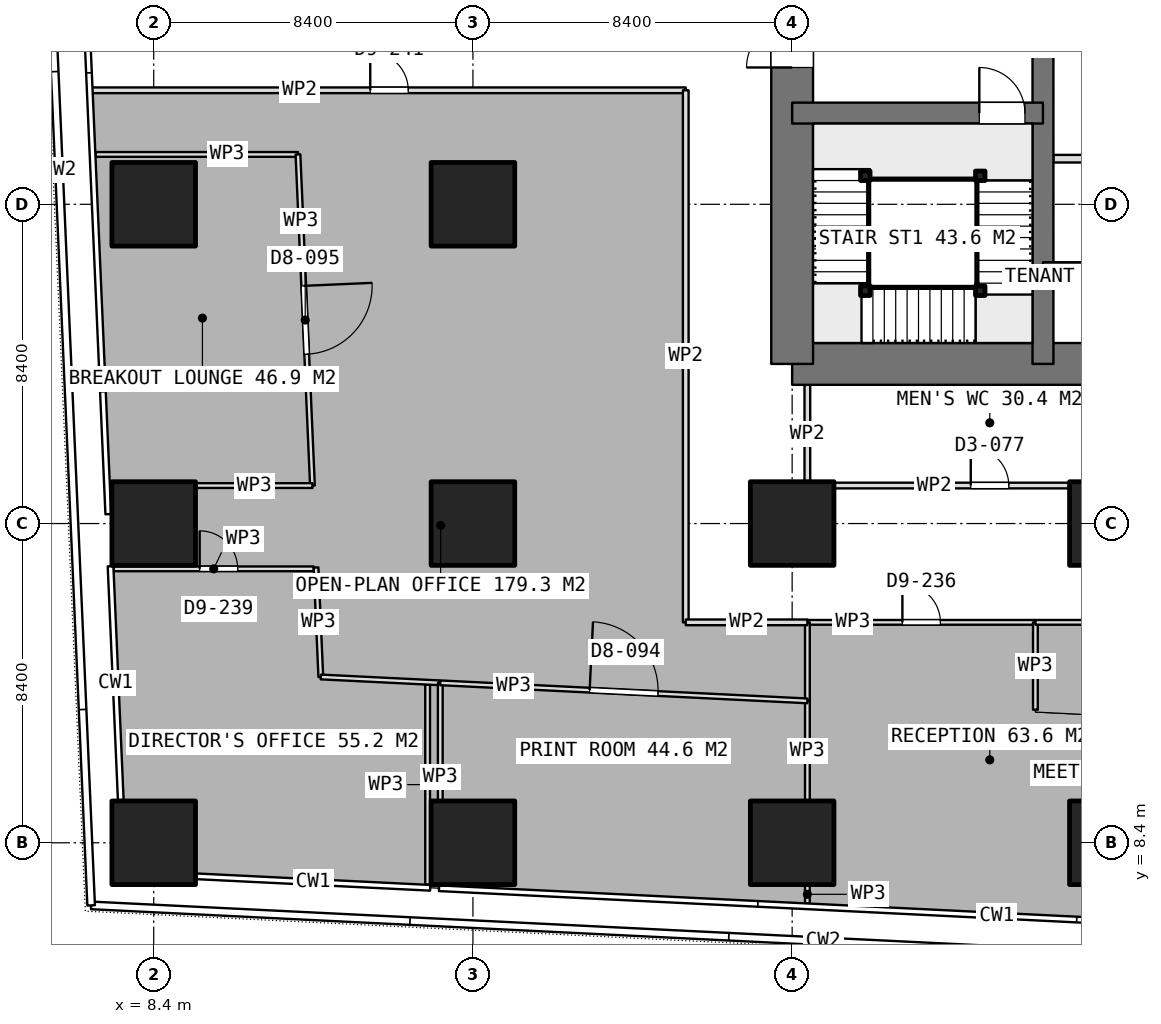
"""IFC4 building model, lengths in metres.
Left out: names, types, materials, properties, quantities, classifications, styles, units other than length and angle.
Written with IfcOpenShell. Run it as: python <this file> out.ifc"""

import sys

from ifc_helpers import new_model, si_unit, direction, frame, frame_2d, origin, origin_2d, place, context, subcontext, project, spatial, rectangle, extrude, element, fill, save


model = new_model("IFC4")
c1 = context("Model", 3, precision=1e-05, world=origin(), true_north=direction((0.0, 1.0)))
c2 = subcontext(c1, "Body", "Model", "MODEL_VIEW")
j1 = project(units=[si_unit("LENGTHUNIT", "METRE"), si_unit("PLANEANGLEUNIT", "RADIAN")], contexts=[c1])
p1 = place(None, origin())
s1 = spatial("IfcSite", under=j1, at=p1, CompositionType="ELEMENT")
p2 = place(p1, origin())
s2 = spatial("IfcBuilding", under=s1, at=p2, CompositionType="ELEMENT")
p3 = place(p2, frame((0.0, 0.0, 70.4)))
s3 = spatial("IfcBuildingStorey", under=s2, at=p3, CompositionType="ELEMENT", Elevation=70.4)
p4 = place(p3, frame((25.2, 21.0, 0.0), z_axis=(0.0, 0.0, 1.0), x_axis=(1.0, 0.0, 0.0)))
e1 = element("IfcWall", 1, at=p4, inside=s3, PredefinedType="SHEAR", context=c2, shape_type="SweptSolid", body=[
    extrude(rectangle(XDim=10.4, YDim=1.1, at=frame_2d((5.2, 0.0))), origin(), (0.0, 0.0, 1.0), 3.75),
])
p5 = place(p3, frame((25.2, 21.0, 0.0), z_axis=(0.0, 0.0, 1.0), x_axis=(0.0, 1.0, 0.0)))
e2 = element("IfcWall", 2, at=p5, inside=s3, PredefinedType="SHEAR", context=c2, shape_type="SweptSolid", body=[
    extrude(rectangle(XDim=25.2, YDim=1.1, at=frame_2d((12.6, 0.0))), origin(), (0.0, 0.0, 1.0), 3.75),
])
p6 = place(p5, frame((7.8, 0.0, 0.0)))
e3 = element("IfcOpeningElement", 3, at=p6, cuts=e2, PredefinedType="OPENING", context=c2, shape_type="SweptSolid", body=[
    extrude(rectangle(XDim=1.2, YDim=2.1, at=frame_2d((0.6, 1.05))), frame((0.0, 0.56, 0.0), z_axis=(0.0, -1.0, 0.0), x_axis=(1.0, 0.0, 0.0)), (0.0, 0.0, 1.0), 1.12),
])
p7 = place(p5, frame((14.25, 0.0, 0.0)))
e4 = element("IfcOpeningElement", 4, at=p7, cuts=e2, PredefinedType="OPENING", context=c2, shape_type="SweptSolid", body=[
    extrude(rectangle(XDim=0.9, YDim=2.1, at=frame_2d((0.45, 1.05))), frame((0.0, 0.56, 0.0), z_axis=(0.0, -1.0, 0.0), x_axis=(1.0, 0.0, 0.0)), (0.0, 0.0, 1.0), 1.12),
])
p8 = place(p5, frame((16.85, 0.0, 0.0)))
e5 = element("IfcOpeningElement", 5, at=p8, cuts=e2, PredefinedType="OPENING", context=c2, shape_type="SweptSolid", body=[
    extrude(rectangle(XDim=0.9, YDim=2.1, at=frame_2d((0.45, 1.05))), frame((0.0, 0.56, 0.0), z_axis=(0.0, -1.0, 0.0), x_axis=(1.0, 0.0, 0.0)), (0.0, 0.0, 1.0), 1.12),
])
p9 = place(p5, frame((19.075, 0.0, 0.0)))
e6 = element("IfcOpeningElement", 6, at=p9, cuts=e2, PredefinedType="OPENING", context=c2, shape_type="SweptSolid", body=[
    extrude(rectangle(XDim=1.2, YDim=2.1, at=frame_2d((0.6, 1.05))), frame((0.0, 0.56, 0.0), z_axis=(0.0, -1.0, 0.0), x_axis=(1.0, 0.0, 0.0)), (0.0, 0.0, 1.0), 1.12),
])
p10 = place(p3, frame((31.8, 21.0, 0.0), z_axis=(0.0, 0.0, 1.0), x_axis=(0.0, 1.0, 0.0)))
e7 = element("IfcWall", 7, at=p10, inside=s3, PredefinedType="SHEAR", context=c2, shape_type="SweptSolid", body=[
    extrude(rectangle(XDim=25.2, YDim=0.55, at=frame_2d((12.6, 0.0))), origin(), (0.0, 0.0, 1.0), 3.75),
])
p11 = place(p3, frame((31.8, 23.4, 0.0), z_axis=(0.0, 0.0, 1.0), x_axis=(1.0, 0.0, 0.0)))
e8 = element("IfcWall", 8, at=p11, inside=s3, PredefinedType="SHEAR", context=c2, shape_type="SweptSolid", body=[
    extrude(rectangle(XDim=3.8, YDim=0.55, at=frame_2d((1.9, 0.0))), origin(), (0.0, 0.0, 1.0), 3.75),
])
p12 = place(p3, frame((25.2, 27.6, 0.0), z_axis=(0.0, 0.0, 1.0), x_axis=(1.0, 0.0, 0.0)))
e9 = element("IfcWall", 9, at=p12, inside=s3, PredefinedType="SHEAR", context=c2, shape_type="SweptSolid", body=[
    extrude(rectangle(XDim=6.6, YDim=0.55, at=frame_2d((3.3, 0.0))), origin(), (0.0, 0.0, 1.0), 3.75),
])
p13 = place(p12, frame((4.925, 0.0, 0.0)))
e10 = element("IfcOpeningElement", 10, at=p13, cuts=e9, PredefinedType="OPENING", context=c2, shape_type="SweptSolid", body=[
    extrude(rectangle(XDim=1.2, YDim=2.1, at=frame_2d((0.6, 1.05))), frame((0.0, 0.285, 0.0), z_axis=(0.0, -1.0, 0.0), x_axis=(1.0, 0.0, 0.0)), (0.0, 0.0, 1.0), 0.57),
])
for number, where, z_axis, x_axis in (
    (11, (8.4, 8.4, 0.0), (0.0, 0.0, 1.0), (1.0, 0.0, 0.0)),
    (12, (8.4, 16.8, 0.0), (0.0, 0.0, 1.0), (1.0, 0.0, 0.0)),
    (13, (8.4, 25.2, 0.0), (0.0, 0.0, 1.0), (1.0, 0.0, 0.0)),
    (14, (16.8, 8.4, 0.0), (0.0, 0.0, 1.0), (1.0, 0.0, 0.0)),
    (15, (16.8, 16.8, 0.0), (0.0, 0.0, 1.0), (1.0, 0.0, 0.0)),
    (16, (16.8, 25.2, 0.0), (0.0, 0.0, 1.0), (1.0, 0.0, 0.0)),
    (17, (25.2, 8.4, 0.0), (0.0, 0.0, 1.0), (1.0, 0.0, 0.0)),
    (18, (25.2, 16.8, 0.0), (0.0, 0.0, 1.0), (1.0, 0.0, 0.0)),
    (19, (33.6, 8.4, 0.0), (0.0, 0.0, 1.0), (1.0, 0.0, 0.0)),
    (20, (33.6, 16.8, 0.0), (0.0, 0.0, 1.0), (1.0, 0.0, 0.0)),
):
    element("IfcColumn", number, at=place(p3, frame(where, z_axis=z_axis, x_axis=x_axis)), inside=s3, PredefinedType="COLUMN", context=c2, shape_type="SweptSolid", body=[
        extrude(rectangle(XDim=2.2, YDim=2.2, at=origin_2d()), origin(), (0.0, 0.0, 1.0), 3.75),
    ])
p14 = place(p3, frame((32.075, 26.4, 0.0), z_axis=(0.0, 0.0, 1.0), x_axis=(1.0, 0.0, 0.0)))
e21 = element("IfcWall", 21, at=p14, inside=s3, PredefinedType="PARTITIONING", context=c2, shape_type="SweptSolid", body=[
    extrude(rectangle(XDim=3.25, YDim=0.2, at=frame_2d((1.625, 0.0))), origin(), (0.0, 0.0, 1.0), 3.5),
])
p15 = place(p3, frame((25.525, 17.8, 0.0), z_axis=(0.0, 0.0, 1.0), x_axis=(1.0, 0.0, 0.0)))
e22 = element("IfcWall", 22, at=p15, inside=s3, PredefinedType="PARTITIONING", context=c2, shape_type="SweptSolid", body=[
    extrude(rectangle(XDim=9.75, YDim=0.15, at=frame_2d((4.875, 0.0))), origin(), (0.0, 0.0, 1.0), 3.5),
])
p16 = place(p15, frame((4.375, 0.0, 0.0)))
e23 = element("IfcOpeningElement", 23, at=p16, cuts=e22, PredefinedType="OPENING", context=c2, shape_type="SweptSolid", body=[
    extrude(rectangle(XDim=1.0, YDim=2.1, at=frame_2d((0.5, 1.05))), frame((0.0, 0.085, 0.0), z_axis=(0.0, -1.0, 0.0), x_axis=(1.0, 0.0, 0.0)), (0.0, 0.0, 1.0), 0.17),
])
p17 = place(p3, frame((25.6, 17.875, 0.0), z_axis=(0.0, 0.0, 1.0), x_axis=(0.0, 1.0, 0.0)))
e24 = element("IfcWall", 24, at=p17, inside=s3, PredefinedType="PARTITIONING", context=c2, shape_type="SweptSolid", body=[
    extrude(rectangle(XDim=2.575, YDim=0.15, at=frame_2d((1.288, 0.0))), origin(), (0.0, 0.0, 1.0), 3.5),
])
p18 = place(p3, frame((25.601, 6.808, 0.0), z_axis=(0.0, 0.0, 1.0), x_axis=(0.0, 1.0, 0.0)))
e25 = element("IfcWall", 25, at=p18, inside=s3, PredefinedType="PARTITIONING", context=c2, shape_type="SweptSolid", body=[
    extrude(rectangle(XDim=0.472, YDim=0.125, at=frame_2d((0.236, 0.0))), origin(), (0.0, 0.0, 1.0), 3.5),
])
p19 = place(p3, frame((25.601, 9.52, 0.0), z_axis=(0.0, 0.0, 1.0), x_axis=(0.0, 1.0, 0.0)))
e26 = element("IfcWall", 26, at=p19, inside=s3, PredefinedType="PARTITIONING", context=c2, shape_type="SweptSolid", body=[
    extrude(rectangle(XDim=2.614, YDim=0.125, at=frame_2d((1.307, 0.0))), origin(), (0.0, 0.0, 1.0), 3.5),
])
p20 = place(p3, frame((25.601, 14.2, 0.0), z_axis=(0.0, 0.0, 1.0), x_axis=(1.0, 0.0, 0.0)))
e27 = element("IfcWall", 27, at=p20, inside=s3, PredefinedType="PARTITIONING", context=c2, shape_type="SweptSolid", body=[
    extrude(rectangle(XDim=6.0, YDim=0.125, at=frame_2d((3.0, 0.0))), origin(), (0.0, 0.0, 1.0), 3.5),
])
p21 = place(p20, frame((2.5, 0.0, 0.0)))
e28 = element("IfcOpeningElement", 28, at=p21, cuts=e27, PredefinedType="OPENING", context=c2, shape_type="SweptSolid", body=[
    extrude(rectangle(XDim=1.0, YDim=2.1, at=frame_2d((0.5, 1.05))), frame((0.0, 0.073, 0.0), z_axis=(0.0, -1.0, 0.0), x_axis=(1.0, 0.0, 0.0)), (0.0, 0.0, 1.0), 0.145),
])
p22 = place(p3, frame((31.601, 14.2, 0.0), z_axis=(0.0, 0.0, 1.0), x_axis=(0.0, -1.0, 0.0)))
e29 = element("IfcWall", 29, at=p22, inside=s3, PredefinedType="PARTITIONING", context=c2, shape_type="SweptSolid", body=[
    extrude(rectangle(XDim=2.298, YDim=0.125, at=frame_2d((1.149, 0.0))), origin(), (0.0, 0.0, 1.0), 3.5),
])
p23 = place(p3, frame((25.601, 12.134, 0.0), z_axis=(0.0, 0.0, 1.0), x_axis=(0.0, 1.0, 0.0)))
e30 = element("IfcWall", 30, at=p23, inside=s3, PredefinedType="PARTITIONING", context=c2, shape_type="SweptSolid", body=[
    extrude(rectangle(XDim=2.066, YDim=0.125, at=frame_2d((1.033, 0.0))), origin(), (0.0, 0.0, 1.0), 3.5),
])
p24 = place(p3, frame((31.601, 14.2, 0.0), z_axis=(0.0, 0.0, 1.0), x_axis=(1.0, 0.0, 0.0)))
e31 = element("IfcWall", 31, at=p24, inside=s3, PredefinedType="PARTITIONING", context=c2, shape_type="SweptSolid", body=[
    extrude(rectangle(XDim=4.699, YDim=0.125, at=frame_2d((2.35, 0.0))), origin(), (0.0, 0.0, 1.0), 3.5),
])
p25 = place(p24, frame((1.849, 0.0, 0.0)))
e32 = element("IfcOpeningElement", 32, at=p25, cuts=e31, PredefinedType="OPENING", context=c2, shape_type="SweptSolid", body=[
    extrude(rectangle(XDim=1.0, YDim=2.1, at=frame_2d((0.5, 1.05))), frame((0.0, 0.073, 0.0), z_axis=(0.0, -1.0, 0.0), x_axis=(1.0, 0.0, 0.0)), (0.0, 0.0, 1.0), 0.145),
])
p26 = place(p3, frame((6.871, 26.512, 0.0), z_axis=(0.0, 0.0, 1.0), x_axis=(1.0, 0.0, 0.0)))
e33 = element("IfcWall", 33, at=p26, inside=s3, PredefinedType="PARTITIONING", context=c2, shape_type="SweptSolid", body=[
    extrude(rectangle(XDim=5.325, YDim=0.125, at=frame_2d((2.663, 0.0))), origin(), (0.0, 0.0, 1.0), 3.5),
])
p27 = place(p3, frame((12.196, 26.512, 0.0), z_axis=(0.0, 0.0, 1.0), x_axis=(0.043670470307, -0.999045989944, 0.0)))
e34 = element("IfcWall", 34, at=p27, inside=s3, PredefinedType="PARTITIONING", context=c2, shape_type="SweptSolid", body=[
    extrude(rectangle(XDim=8.721, YDim=0.125, at=frame_2d((4.361, 0.0))), origin(), (0.0, 0.0, 1.0), 3.5),
])
p28 = place(p27, frame((3.461, 0.0, 0.0)))
e35 = element("IfcOpeningElement", 35, at=p28, cuts=e34, PredefinedType="OPENING", context=c2, shape_type="SweptSolid", body=[
    extrude(rectangle(XDim=1.8, YDim=2.1, at=frame_2d((0.9, 1.05))), frame((0.0, 0.073, 0.0), z_axis=(0.0, -1.0, 0.0), x_axis=(1.0, 0.0, 0.0)), (0.0, 0.0, 1.0), 0.145),
])
p29 = place(p3, frame((12.577, 17.799, 0.0), z_axis=(0.0, 0.0, 1.0), x_axis=(-1.0, 0.0, 0.0)))
e36 = element("IfcWall", 36, at=p29, inside=s3, PredefinedType="PARTITIONING", context=c2, shape_type="SweptSolid", body=[
    extrude(rectangle(XDim=3.057, YDim=0.125, at=frame_2d((1.528, 0.0))), origin(), (0.0, 0.0, 1.0), 3.5),
])
p30 = place(p3, frame((15.608, 12.562, 0.0), z_axis=(0.0, 0.0, 1.0), x_axis=(0.0, -1.0, 0.0)))
e37 = element("IfcWall", 37, at=p30, inside=s3, PredefinedType="PARTITIONING", context=c2, shape_type="SweptSolid", body=[
    extrude(rectangle(XDim=5.263, YDim=0.125, at=frame_2d((2.631, 0.0))), origin(), (0.0, 0.0, 1.0), 3.5),
])
p31 = place(p3, frame((7.347, 15.608, 0.0), z_axis=(0.0, 0.0, 1.0), x_axis=(1.0, 0.0, 0.0)))
e38 = element("IfcWall", 38, at=p31, inside=s3, PredefinedType="PARTITIONING", context=c2, shape_type="SweptSolid", body=[
    extrude(rectangle(XDim=5.263, YDim=0.125, at=frame_2d((2.632, 0.0))), origin(), (0.0, 0.0, 1.0), 3.5),
])
p32 = place(p31, frame((2.262, 0.0, 0.0)))
e39 = element("IfcOpeningElement", 39, at=p32, cuts=e38, PredefinedType="OPENING", context=c2, shape_type="SweptSolid", body=[
    extrude(rectangle(XDim=1.0, YDim=2.1, at=frame_2d((0.5, 1.05))), frame((0.0, 0.073, 0.0), z_axis=(0.0, -1.0, 0.0), x_axis=(1.0, 0.0, 0.0)), (0.0, 0.0, 1.0), 0.145),
])
p33 = place(p3, frame((12.671, 15.643, 0.0), z_axis=(0.0, 0.0, 1.0), x_axis=(0.043782676762, -0.999041078843, 0.0)))
e40 = element("IfcWall", 40, at=p33, inside=s3, PredefinedType="PARTITIONING", context=c2, shape_type="SweptSolid", body=[
    extrude(rectangle(XDim=2.883, YDim=0.125, at=frame_2d((1.441, 0.0))), origin(), (0.0, 0.0, 1.0), 3.5),
])
p34 = place(p3, frame((12.797, 12.763, 0.0), z_axis=(0.0, 0.0, 1.0), x_axis=(0.998790140287, -0.049175762993, 0.0)))
e41 = element("IfcWall", 41, at=p34, inside=s3, PredefinedType="PARTITIONING", context=c2, shape_type="SweptSolid", body=[
    extrude(rectangle(XDim=3.133, YDim=0.125, at=frame_2d((1.566, 0.0))), origin(), (0.0, 0.0, 1.0), 3.5),
])
p35 = place(p3, frame((15.941, 9.52, 0.0), z_axis=(0.0, 0.0, 1.0), x_axis=(0.0, 1.0, 0.0)))
e42 = element("IfcWall", 42, at=p35, inside=s3, PredefinedType="PARTITIONING", context=c2, shape_type="SweptSolid", body=[
    extrude(rectangle(XDim=3.089, YDim=0.125, at=frame_2d((1.544, 0.0))), origin(), (0.0, 0.0, 1.0), 3.5),
])
p36 = place(p3, frame((15.941, 12.609, 0.0), z_axis=(0.0, 0.0, 1.0), x_axis=(0.998793791176, -0.049101555046, 0.0)))
e43 = element("IfcWall", 43, at=p36, inside=s3, PredefinedType="PARTITIONING", context=c2, shape_type="SweptSolid", body=[
    extrude(rectangle(XDim=9.671, YDim=0.125, at=frame_2d((4.835, 0.0))), origin(), (0.0, 0.0, 1.0), 3.5),
])
p37 = place(p36, frame((3.935, 0.0, 0.0)))
e44 = element("IfcOpeningElement", 44, at=p37, cuts=e43, PredefinedType="OPENING", context=c2, shape_type="SweptSolid", body=[
    extrude(rectangle(XDim=1.8, YDim=2.1, at=frame_2d((0.9, 1.05))), frame((0.0, 0.073, 0.0), z_axis=(0.0, -1.0, 0.0), x_axis=(1.0, 0.0, 0.0)), (0.0, 0.0, 1.0), 0.145),
])
p38 = place(p3, frame((6.767, 28.2, 0.0), z_axis=(0.0, 0.0, 1.0), x_axis=(1.0, 0.0, 0.0)))
e45 = element("IfcWall", 45, at=p38, inside=s3, PredefinedType="PARTITIONING", context=c2, shape_type="SweptSolid", body=[
    extrude(rectangle(XDim=15.633, YDim=0.15, at=frame_2d((7.816, 0.0))), origin(), (0.0, 0.0, 1.0), 3.5),
])
p39 = place(p38, frame((7.331, 0.0, 0.0)))
e46 = element("IfcOpeningElement", 46, at=p39, cuts=e45, PredefinedType="OPENING", context=c2, shape_type="SweptSolid", body=[
    extrude(rectangle(XDim=1.0, YDim=2.1, at=frame_2d((0.5, 1.05))), frame((0.0, 0.085, 0.0), z_axis=(0.0, -1.0, 0.0), x_axis=(1.0, 0.0, 0.0)), (0.0, 0.0, 1.0), 0.17),
])
p40 = place(p3, frame((22.4, 28.2, 0.0), z_axis=(0.0, 0.0, 1.0), x_axis=(0.0, -1.0, 0.0)))
e47 = element("IfcWall", 47, at=p40, inside=s3, PredefinedType="PARTITIONING", context=c2, shape_type="SweptSolid", body=[
    extrude(rectangle(XDim=14.0, YDim=0.15, at=frame_2d((7.0, 0.0))), origin(), (0.0, 0.0, 1.0), 3.5),
])
p41 = place(p3, frame((22.4, 14.2, 0.0), z_axis=(0.0, 0.0, 1.0), x_axis=(1.0, 0.0, 0.0)))
e48 = element("IfcWall", 48, at=p41, inside=s3, PredefinedType="PARTITIONING", context=c2, shape_type="SweptSolid", body=[
    extrude(rectangle(XDim=3.2, YDim=0.15, at=frame_2d((1.6, 0.0))), origin(), (0.0, 0.0, 1.0), 3.5),
])
for number, where, z_axis, x_axis in (
    (49, (30.15, 25.95, 0.0), (0.0, 0.0, 1.0), (1.0, 0.0, 0.0)),
    (50, (30.15, 22.925, 0.0), (0.0, 0.0, 1.0), (1.0, 0.0, 0.0)),
    (51, (27.125, 22.925, 0.0), (0.0, 0.0, 1.0), (1.0, 0.0, 0.0)),
    (52, (27.125, 25.95, 0.0), (0.0, 0.0, 1.0), (1.0, 0.0, 0.0)),
):
    element("IfcColumn", number, at=place(p3, frame(where, z_axis=z_axis, x_axis=x_axis)), inside=s3, PredefinedType="COLUMN", context=c2, shape_type="SweptSolid", body=[
        extrude(rectangle(XDim=0.25, YDim=0.25, at=origin_2d()), origin(), (0.0, 0.0, 1.0), 3.75),
    ])
p42 = place(p6, origin())
e53 = element("IfcDoor", 53, at=p42, inside=s3, OperationType="SINGLE_SWING_LEFT", PredefinedType="DOOR", context=c2, shape_type="SweptSolid", body=[
    extrude(rectangle(XDim=1.2, YDim=2.1, at=frame_2d((0.6, 1.05))), frame((0.0, 0.025, 0.0), z_axis=(0.0, -1.0, 0.0), x_axis=(1.0, 0.0, 0.0)), (0.0, 0.0, 1.0), 0.05),
])
fill(e3, e53)
p43 = place(p16, origin())
e54 = element("IfcDoor", 54, at=p43, inside=s3, OperationType="SINGLE_SWING_LEFT", PredefinedType="DOOR", context=c2, shape_type="SweptSolid", body=[
    extrude(rectangle(XDim=1.0, YDim=2.1, at=frame_2d((0.5, 1.05))), frame((0.0, 0.025, 0.0), z_axis=(0.0, -1.0, 0.0), x_axis=(1.0, 0.0, 0.0)), (0.0, 0.0, 1.0), 0.05),
])
fill(e23, e54)
p44 = place(p21, origin())
e55 = element("IfcDoor", 55, at=p44, inside=s3, OperationType="SINGLE_SWING_LEFT", PredefinedType="DOOR", context=c2, shape_type="SweptSolid", body=[
    extrude(rectangle(XDim=1.0, YDim=2.1, at=frame_2d((0.5, 1.05))), frame((0.0, 0.025, 0.0), z_axis=(0.0, -1.0, 0.0), x_axis=(1.0, 0.0, 0.0)), (0.0, 0.0, 1.0), 0.05),
])
fill(e28, e55)
p45 = place(p28, origin())
e56 = element("IfcDoor", 56, at=p45, inside=s3, OperationType="DOUBLE_DOOR_SINGLE_SWING", PredefinedType="DOOR", context=c2, shape_type="SweptSolid", body=[
    extrude(rectangle(XDim=1.8, YDim=2.1, at=frame_2d((0.9, 1.05))), frame((0.0, 0.025, 0.0), z_axis=(0.0, -1.0, 0.0), x_axis=(1.0, 0.0, 0.0)), (0.0, 0.0, 1.0), 0.05),
])
fill(e35, e56)
p46 = place(p32, origin())
e57 = element("IfcDoor", 57, at=p46, inside=s3, OperationType="SINGLE_SWING_LEFT", PredefinedType="DOOR", context=c2, shape_type="SweptSolid", body=[
    extrude(rectangle(XDim=1.0, YDim=2.1, at=frame_2d((0.5, 1.05))), frame((0.0, 0.025, 0.0), z_axis=(0.0, -1.0, 0.0), x_axis=(1.0, 0.0, 0.0)), (0.0, 0.0, 1.0), 0.05),
])
fill(e39, e57)
p47 = place(p37, origin())
e58 = element("IfcDoor", 58, at=p47, inside=s3, OperationType="DOUBLE_DOOR_SINGLE_SWING", PredefinedType="DOOR", context=c2, shape_type="SweptSolid", body=[
    extrude(rectangle(XDim=1.8, YDim=2.1, at=frame_2d((0.9, 1.05))), frame((0.0, 0.025, 0.0), z_axis=(0.0, -1.0, 0.0), x_axis=(1.0, 0.0, 0.0)), (0.0, 0.0, 1.0), 0.05),
])
fill(e44, e58)
p48 = place(p39, origin())
e59 = element("IfcDoor", 59, at=p48, inside=s3, OperationType="SINGLE_SWING_LEFT", PredefinedType="DOOR", context=c2, shape_type="SweptSolid", body=[
    extrude(rectangle(XDim=1.0, YDim=2.1, at=frame_2d((0.5, 1.05))), frame((0.0, 0.025, 0.0), z_axis=(0.0, -1.0, 0.0), x_axis=(1.0, 0.0, 0.0)), (0.0, 0.0, 1.0), 0.05),
])
fill(e46, e59)
p49 = place(p13, origin())
e60 = element("IfcDoor", 60, at=p49, inside=s3, OperationType="SINGLE_SWING_RIGHT", PredefinedType="DOOR", context=c2, shape_type="SweptSolid", body=[
    extrude(rectangle(XDim=1.2, YDim=2.1, at=frame_2d((0.6, 1.05))), frame((0.0, 0.025, 0.0), z_axis=(0.0, -1.0, 0.0), x_axis=(1.0, 0.0, 0.0)), (0.0, 0.0, 1.0), 0.05),
])
fill(e10, e60)
save(model, sys.argv[1])
